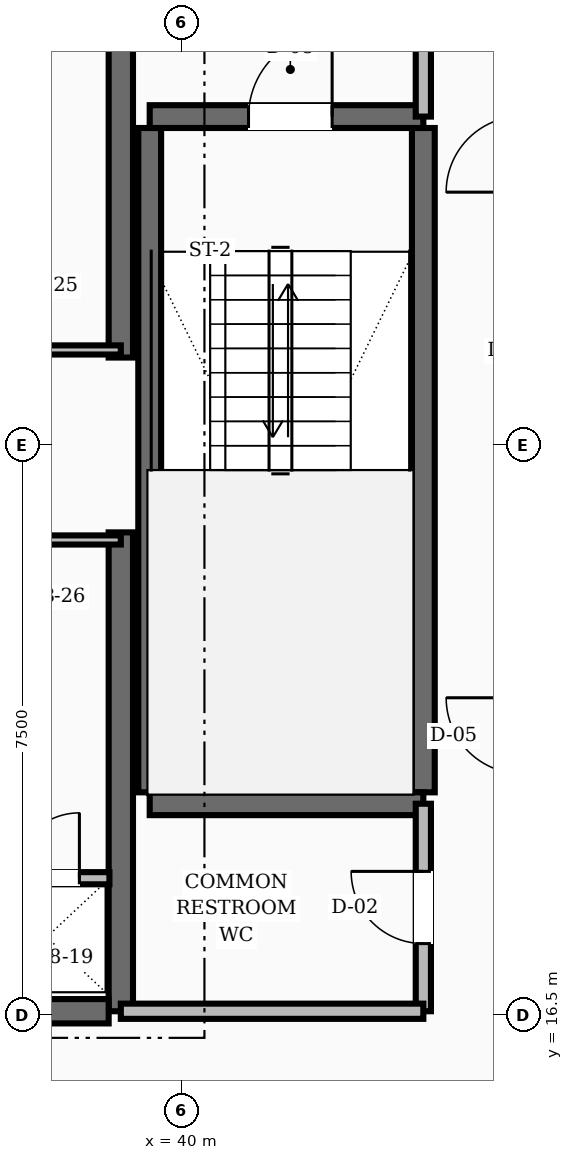
"""IFC4 building model, lengths in metres.
Left out: names, types, materials, properties, quantities, classifications, styles, units other than length and angle.
Written with IfcOpenShell. Run it as: python <this file> out.ifc"""

import sys

from ifc_helpers import new_model, si_unit, direction, frame, frame_2d, origin, place, context, subcontext, project, spatial, rectangle, extrude, element, fill, save


model = new_model("IFC4")
c1 = context("Model", 3, precision=1e-05, world=origin(), true_north=direction((0.0, 1.0)))
c2 = subcontext(c1, "Body", "Model", "MODEL_VIEW")
j1 = project(units=[si_unit("LENGTHUNIT", "METRE"), si_unit("PLANEANGLEUNIT", "RADIAN")], contexts=[c1])
p1 = place(None, origin())
s1 = spatial("IfcSite", under=j1, at=p1, CompositionType="ELEMENT")
p2 = place(p1, origin())
s2 = spatial("IfcBuilding", under=s1, at=p2, CompositionType="ELEMENT")
p3 = place(p2, frame((0.0, 0.0, 225.6)))
s3 = spatial("IfcBuildingStorey", under=s2, at=p3, CompositionType="ELEMENT", Elevation=225.6)
for number, where, z_axis, x_axis in (
    (1, (39.2, 16.55, 0.0), (0.0, 0.0, 1.0), (0.0, 1.0, 0.0)),
    (2, (39.2, 25.15, 0.0), (0.0, 0.0, 1.0), (0.0, 1.0, 0.0)),
):
    element("IfcWall", number, at=place(p3, frame(where, z_axis=z_axis, x_axis=x_axis)), inside=s3, PredefinedType="SHEAR", context=c2, shape_type="SweptSolid", body=[
        extrude(rectangle(XDim=6.3, YDim=0.32, at=frame_2d((3.15, 0.0))), origin(), (0.0, 0.0, 1.0), 3.6),
    ])
p4 = place(p3, frame((35.8, 16.55, 0.0), z_axis=(0.0, 0.0, 1.0), x_axis=(1.0, 0.0, 0.0)))
e3 = element("IfcWall", 3, at=p4, inside=s3, PredefinedType="SHEAR", context=c2, shape_type="SweptSolid", body=[
    extrude(rectangle(XDim=3.24, YDim=0.32, at=frame_2d((1.62, 0.0))), origin(), (0.0, 0.0, 1.0), 3.6),
])
p5 = place(p4, frame((0.3, 0.0, 0.0)))
e4 = element("IfcOpeningElement", 4, at=p5, cuts=e3, PredefinedType="OPENING", context=c2, shape_type="SweptSolid", body=[
    extrude(rectangle(XDim=1.1, YDim=2.1, at=frame_2d((0.55, 1.05))), frame((0.0, 0.17, 0.0), z_axis=(0.0, -1.0, 0.0), x_axis=(1.0, 0.0, 0.0)), (0.0, 0.0, 1.0), 0.34),
])
for number, where, z_axis, x_axis in (
    (5, (43.18, 19.43, 0.0), (0.0, 0.0, 1.0), (0.0, 1.0, 0.0)),
    (6, (39.58, 19.43, 0.0), (0.0, 0.0, 1.0), (0.0, 1.0, 0.0)),
):
    element("IfcWall", number, at=place(p3, frame(where, z_axis=z_axis, x_axis=x_axis)), inside=s3, PredefinedType="SHEAR", context=c2, shape_type="SweptSolid", body=[
        extrude(rectangle(XDim=8.74, YDim=0.3, at=frame_2d((4.37, 0.0))), origin(), (0.0, 0.0, 1.0), 3.6),
    ])
p6 = place(p3, frame((39.58, 19.28, 0.0), z_axis=(0.0, 0.0, 1.0), x_axis=(1.0, 0.0, 0.0)))
e7 = element("IfcWall", 7, at=p6, inside=s3, PredefinedType="SHEAR", context=c2, shape_type="SweptSolid", body=[
    extrude(rectangle(XDim=3.6, YDim=0.3, at=frame_2d((1.8, 0.0))), origin(), (0.0, 0.0, 1.0), 3.6),
])
p7 = place(p3, frame((39.58, 28.32, 0.0), z_axis=(0.0, 0.0, 1.0), x_axis=(1.0, 0.0, 0.0)))
e8 = element("IfcWall", 8, at=p7, inside=s3, PredefinedType="SHEAR", context=c2, shape_type="SweptSolid", body=[
    extrude(rectangle(XDim=3.6, YDim=0.3, at=frame_2d((1.8, 0.0))), origin(), (0.0, 0.0, 1.0), 3.6),
])
p8 = place(p7, frame((1.3, 0.0, 0.0)))
e9 = element("IfcOpeningElement", 9, at=p8, cuts=e8, PredefinedType="OPENING", context=c2, shape_type="SweptSolid", body=[
    extrude(rectangle(XDim=1.1, YDim=2.1, at=frame_2d((0.55, 1.05))), frame((0.0, 0.16, 0.0), z_axis=(0.0, -1.0, 0.0), x_axis=(1.0, 0.0, 0.0)), (0.0, 0.0, 1.0), 0.32),
])
p9 = place(p3, frame((43.18, 28.32, 0.0), z_axis=(0.0, 0.0, 1.0), x_axis=(0.0, 1.0, 0.0)))
e10 = element("IfcWall", 10, at=p9, inside=s3, PredefinedType="SOLIDWALL", context=c2, shape_type="SweptSolid", body=[
    extrude(rectangle(XDim=3.13, YDim=0.2, at=frame_2d((1.565, 0.0))), origin(), (0.0, 0.0, 1.0), 2.87),
])
p10 = place(p9, frame((1.015, 0.0, 0.0)))
e11 = element("IfcOpeningElement", 11, at=p10, cuts=e10, PredefinedType="OPENING", context=c2, shape_type="SweptSolid", body=[
    extrude(rectangle(XDim=1.1, YDim=2.1, at=frame_2d((0.55, 1.05))), frame((0.0, 0.11, 0.0), z_axis=(0.0, -1.0, 0.0), x_axis=(1.0, 0.0, 0.0)), (0.0, 0.0, 1.0), 0.22),
])
p11 = place(p3, frame((43.18, 16.55, 0.0), z_axis=(0.0, 0.0, 1.0), x_axis=(0.0, 1.0, 0.0)))
e12 = element("IfcWall", 12, at=p11, inside=s3, PredefinedType="SOLIDWALL", context=c2, shape_type="SweptSolid", body=[
    extrude(rectangle(XDim=2.73, YDim=0.2, at=frame_2d((1.365, 0.0))), origin(), (0.0, 0.0, 1.0), 2.87),
])
p12 = place(p11, frame((0.89, 0.0, 0.0)))
e13 = element("IfcOpeningElement", 13, at=p12, cuts=e12, PredefinedType="OPENING", context=c2, shape_type="SweptSolid", body=[
    extrude(rectangle(XDim=0.95, YDim=2.1, at=frame_2d((0.475, 1.05))), frame((0.0, 0.11, 0.0), z_axis=(0.0, -1.0, 0.0), x_axis=(1.0, 0.0, 0.0)), (0.0, 0.0, 1.0), 0.22),
])
p13 = place(p3, frame((39.2, 16.55, 0.0), z_axis=(0.0, 0.0, 1.0), x_axis=(1.0, 0.0, 0.0)))
e14 = element("IfcWall", 14, at=p13, inside=s3, PredefinedType="SOLIDWALL", context=c2, shape_type="SweptSolid", body=[
    extrude(rectangle(XDim=3.98, YDim=0.2, at=frame_2d((1.99, 0.0))), origin(), (0.0, 0.0, 1.0), 2.87),
])
p14 = place(p3, frame((37.4, 18.3, 0.0), z_axis=(0.0, 0.0, 1.0), x_axis=(1.0, 0.0, 0.0)))
e15 = element("IfcWall", 15, at=p14, inside=s3, PredefinedType="SOLIDWALL", context=c2, shape_type="SweptSolid", body=[
    extrude(rectangle(XDim=1.65, YDim=0.16, at=frame_2d((0.825, 0.0))), origin(), (0.0, 0.0, 1.0), 2.87),
])
p15 = place(p14, frame((0.395, 0.0, 0.0)))
e16 = element("IfcOpeningElement", 16, at=p15, cuts=e15, PredefinedType="OPENING", context=c2, shape_type="SweptSolid", body=[
    extrude(rectangle(XDim=0.86, YDim=2.1, at=frame_2d((0.43, 1.05))), frame((0.0, 0.09, 0.0), z_axis=(0.0, -1.0, 0.0), x_axis=(1.0, 0.0, 0.0)), (0.0, 0.0, 1.0), 0.18),
])
for number, where, z_axis, x_axis in (
    (17, (37.4, 25.25, 0.0), (0.0, 0.0, 1.0), (1.0, 0.0, 0.0)),
    (18, (37.4, 22.75, 0.0), (0.0, 0.0, 1.0), (1.0, 0.0, 0.0)),
):
    element("IfcWall", number, at=place(p3, frame(where, z_axis=z_axis, x_axis=x_axis)), inside=s3, PredefinedType="PARTITIONING", context=c2, shape_type="SweptSolid", body=[
        extrude(rectangle(XDim=1.8, YDim=0.12, at=frame_2d((0.9, 0.0))), origin(), (0.0, 0.0, 1.0), 2.87),
    ])
p16 = place(p3, frame((42.365, 13.635, 0.0), z_axis=(0.0, 0.0, 1.0), x_axis=(0.707106781187, 0.707106781187, 0.0)))
e19 = element("IfcWall", 19, at=p16, inside=s3, PredefinedType="SOLIDWALL", context=c2, shape_type="SweptSolid", body=[
    extrude(rectangle(XDim=2.916, YDim=0.16, at=frame_2d((1.458, 0.0))), origin(), (0.0, 0.0, 1.0), 2.87),
])
p17 = place(p8, origin())
e20 = element("IfcDoor", 20, at=p17, inside=s3, OperationType="SINGLE_SWING_RIGHT", PredefinedType="DOOR", context=c2, shape_type="SweptSolid", body=[
    extrude(rectangle(XDim=1.1, YDim=2.1, at=frame_2d((0.55, 1.05))), frame((0.0, 0.025, 0.0), z_axis=(0.0, -1.0, 0.0), x_axis=(1.0, 0.0, 0.0)), (0.0, 0.0, 1.0), 0.05),
])
fill(e9, e20)
p18 = place(p12, origin())
e21 = element("IfcDoor", 21, at=p18, inside=s3, OperationType="SINGLE_SWING_RIGHT", PredefinedType="DOOR", context=c2, shape_type="SweptSolid", body=[
    extrude(rectangle(XDim=0.95, YDim=2.1, at=frame_2d((0.475, 1.05))), frame((0.0, 0.025, 0.0), z_axis=(0.0, -1.0, 0.0), x_axis=(1.0, 0.0, 0.0)), (0.0, 0.0, 1.0), 0.05),
])
fill(e13, e21)
p19 = place(p15, origin())
e22 = element("IfcDoor", 22, at=p19, inside=s3, OperationType="SINGLE_SWING_RIGHT", PredefinedType="TRAPDOOR", context=c2, shape_type="SweptSolid", body=[
    extrude(rectangle(XDim=0.86, YDim=2.1, at=frame_2d((0.43, 1.05))), frame((0.0, 0.025, 0.0), z_axis=(0.0, -1.0, 0.0), x_axis=(1.0, 0.0, 0.0)), (0.0, 0.0, 1.0), 0.05),
])
fill(e16, e22)
save(model, sys.argv[1])
